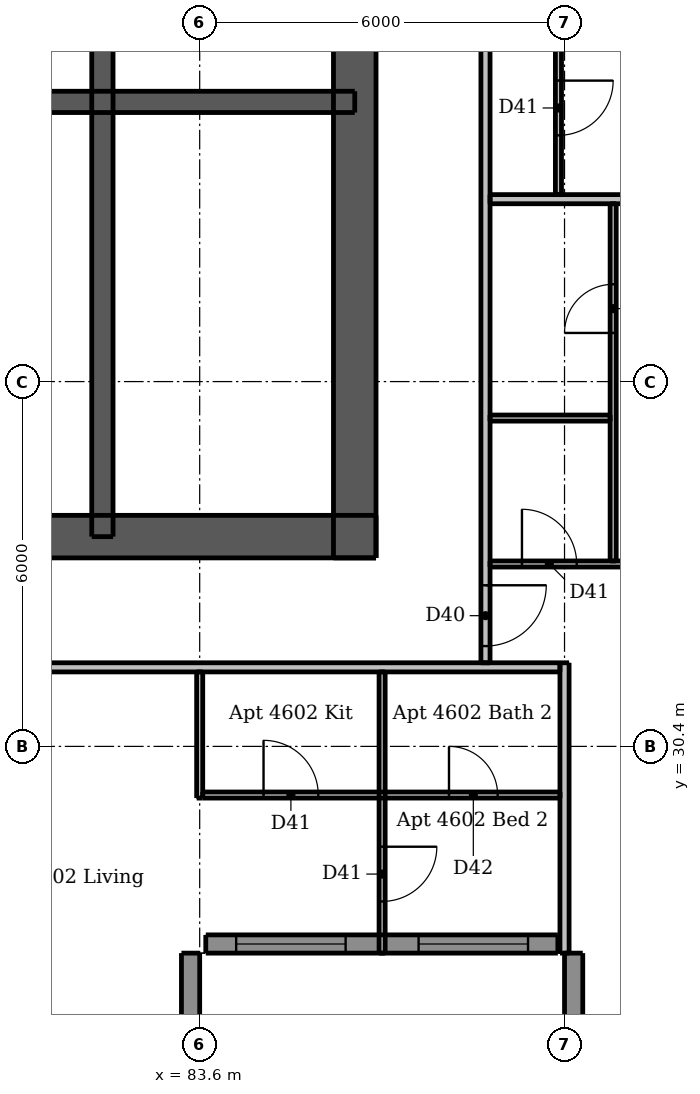
"""IFC4 building model, lengths in metres.
Left out: names, types, materials, properties, quantities, classifications, styles, units other than length and angle.
Written with IfcOpenShell. Run it as: python <this file> out.ifc"""

import sys

from ifc_helpers import new_model, si_unit, direction, frame, frame_2d, origin, place, context, subcontext, project, spatial, rectangle, extrude, element, fill, save


model = new_model("IFC4")
c1 = context("Model", 3, precision=1e-05, world=origin(), true_north=direction((0.0, 1.0)))
c2 = subcontext(c1, "Body", "Model", "MODEL_VIEW")
j1 = project(units=[si_unit("LENGTHUNIT", "METRE"), si_unit("PLANEANGLEUNIT", "RADIAN")], contexts=[c1])
p1 = place(None, origin())
s1 = spatial("IfcSite", under=j1, at=p1, CompositionType="ELEMENT")
p2 = place(p1, origin())
s2 = spatial("IfcBuilding", under=s1, at=p2, CompositionType="ELEMENT")
p3 = place(p2, frame((0.0, 0.0, 171.4)))
s3 = spatial("IfcBuildingStorey", under=s2, at=p3, CompositionType="ELEMENT", Elevation=171.4)
p4 = place(p3, frame((62.5, 33.85, 0.0), z_axis=(0.0, 0.0, 1.0), x_axis=(1.0, 0.0, 0.0)))
e1 = element("IfcWall", 1, at=p4, inside=s3, PredefinedType="SHEAR", context=c2, shape_type="SweptSolid", body=[
    extrude(rectangle(XDim=24.0, YDim=0.7, at=frame_2d((12.0, 0.0))), origin(), (0.0, 0.0, 1.0), 3.05),
])
p5 = place(p4, frame((1.962, 0.0, 0.0)))
e2 = element("IfcOpeningElement", 2, at=p5, cuts=e1, PredefinedType="OPENING", context=c2, shape_type="SweptSolid", body=[
    extrude(rectangle(XDim=1.1, YDim=2.1, at=frame_2d((0.55, 1.05))), frame((0.0, 0.36, 0.0), z_axis=(0.0, -1.0, 0.0), x_axis=(1.0, 0.0, 0.0)), (0.0, 0.0, 1.0), 0.72),
])
p6 = place(p4, frame((20.938, 0.0, 0.0)))
e3 = element("IfcOpeningElement", 3, at=p6, cuts=e1, PredefinedType="OPENING", context=c2, shape_type="SweptSolid", body=[
    extrude(rectangle(XDim=1.1, YDim=2.1, at=frame_2d((0.55, 1.05))), frame((0.0, 0.36, 0.0), z_axis=(0.0, -1.0, 0.0), x_axis=(1.0, 0.0, 0.0)), (0.0, 0.0, 1.0), 0.72),
])
p7 = place(p4, frame((8.0, 0.0, 0.0)))
e4 = element("IfcOpeningElement", 4, at=p7, cuts=e1, PredefinedType="OPENING", context=c2, shape_type="SweptSolid", body=[
    extrude(rectangle(XDim=1.1, YDim=2.1, at=frame_2d((0.55, 1.05))), frame((0.0, 0.36, 0.0), z_axis=(0.0, -1.0, 0.0), x_axis=(1.0, 0.0, 0.0)), (0.0, 0.0, 1.0), 0.72),
])
p8 = place(p4, frame((16.375, 0.0, 0.0)))
e5 = element("IfcOpeningElement", 5, at=p8, cuts=e1, PredefinedType="OPENING", context=c2, shape_type="SweptSolid", body=[
    extrude(rectangle(XDim=0.9, YDim=2.1, at=frame_2d((0.45, 1.05))), frame((0.0, 0.36, 0.0), z_axis=(0.0, -1.0, 0.0), x_axis=(1.0, 0.0, 0.0)), (0.0, 0.0, 1.0), 0.72),
])
p9 = place(p3, frame((86.15, 33.5, 0.0), z_axis=(0.0, 0.0, 1.0), x_axis=(0.0, 1.0, 0.0)))
e6 = element("IfcWall", 6, at=p9, inside=s3, PredefinedType="SHEAR", context=c2, shape_type="SweptSolid", body=[
    extrude(rectangle(XDim=24.0, YDim=0.7, at=frame_2d((12.0, 0.0))), origin(), (0.0, 0.0, 1.0), 3.05),
])
p10 = place(p9, frame((11.2, 0.0, 0.0)))
e7 = element("IfcOpeningElement", 7, at=p10, cuts=e6, PredefinedType="OPENING", context=c2, shape_type="SweptSolid", body=[
    extrude(rectangle(XDim=1.6, YDim=2.1, at=frame_2d((0.8, 1.05))), frame((0.0, 0.36, 0.0), z_axis=(0.0, -1.0, 0.0), x_axis=(1.0, 0.0, 0.0)), (0.0, 0.0, 1.0), 0.72),
])
p11 = place(p3, frame((62.85, 41.0, 0.0), z_axis=(0.0, 0.0, 1.0), x_axis=(1.0, 0.0, 0.0)))
e8 = element("IfcWall", 8, at=p11, inside=s3, PredefinedType="SHEAR", context=c2, shape_type="SweptSolid", body=[
    extrude(rectangle(XDim=23.3, YDim=0.35, at=frame_2d((11.65, 0.0))), origin(), (0.0, 0.0, 1.0), 3.05),
])
p12 = place(p3, frame((82.0, 33.85, 0.0), z_axis=(0.0, 0.0, 1.0), x_axis=(0.0, 1.0, 0.0)))
e9 = element("IfcWall", 9, at=p12, inside=s3, PredefinedType="SHEAR", context=c2, shape_type="SweptSolid", body=[
    extrude(rectangle(XDim=10.05, YDim=0.35, at=frame_2d((5.025, 0.0))), origin(), (0.0, 0.0, 1.0), 3.05),
])
for number, where, z_axis, x_axis in (
    (10, (83.45, 25.3, 0.0), (0.0, 0.0, 1.0), (0.0, 1.0, 0.0)),
    (11, (89.75, 27.0, 0.0), (0.0, 0.0, 1.0), (0.0, -1.0, 0.0)),
):
    element("IfcWall", number, at=place(p3, frame(where, z_axis=z_axis, x_axis=x_axis)), inside=s3, PredefinedType="SOLIDWALL", context=c2, shape_type="SweptSolid", body=[
        extrude(rectangle(XDim=1.7, YDim=0.3, at=frame_2d((0.85, 0.0))), origin(), (0.0, 0.0, 1.0), 3.05),
    ])
p13 = place(p3, frame((83.7, 27.15, 0.0), z_axis=(0.0, 0.0, 1.0), x_axis=(1.0, 0.0, 0.0)))
e12 = element("IfcWall", 12, at=p13, inside=s3, PredefinedType="SOLIDWALL", context=c2, shape_type="SweptSolid", body=[
    extrude(rectangle(XDim=5.79, YDim=0.3, at=frame_2d((2.895, 0.0))), origin(), (0.0, 0.0, 1.0), 3.05),
])
p14 = place(p13, frame((0.5, 0.0, 0.15)))
e13 = element("IfcOpeningElement", 13, at=p14, cuts=e12, PredefinedType="OPENING", context=c2, shape_type="SweptSolid", body=[
    extrude(rectangle(XDim=1.8, YDim=2.1, at=frame_2d((0.9, 1.05))), frame((0.0, 0.16, 0.0), z_axis=(0.0, -1.0, 0.0), x_axis=(1.0, 0.0, 0.0)), (0.0, 0.0, 1.0), 0.32),
])
p15 = place(p13, frame((3.5, 0.0, 0.15)))
e14 = element("IfcOpeningElement", 14, at=p15, cuts=e12, PredefinedType="OPENING", context=c2, shape_type="SweptSolid", body=[
    extrude(rectangle(XDim=1.8, YDim=2.1, at=frame_2d((0.9, 1.05))), frame((0.0, 0.16, 0.0), z_axis=(0.0, -1.0, 0.0), x_axis=(1.0, 0.0, 0.0)), (0.0, 0.0, 1.0), 0.32),
])
p16 = place(p3, frame((83.6, 29.55, 0.0), z_axis=(0.0, 0.0, 1.0), x_axis=(0.0, 1.0, 0.0)))
e15 = element("IfcWall", 15, at=p16, inside=s3, PredefinedType="PARTITIONING", context=c2, shape_type="SweptSolid", body=[
    extrude(rectangle(XDim=2.075, YDim=0.1, at=frame_2d((1.038, 0.0))), origin(), (0.0, 0.0, 1.0), 2.59),
])
p17 = place(p3, frame((86.6, 31.625, 0.0), z_axis=(0.0, 0.0, 1.0), x_axis=(0.0, -1.0, 0.0)))
e16 = element("IfcWall", 16, at=p17, inside=s3, PredefinedType="PARTITIONING", context=c2, shape_type="SweptSolid", body=[
    extrude(rectangle(XDim=4.625, YDim=0.1, at=frame_2d((2.312, 0.0))), origin(), (0.0, 0.0, 1.0), 3.05),
])
p18 = place(p17, frame((2.875, 0.0, 0.0)))
e17 = element("IfcOpeningElement", 17, at=p18, cuts=e16, PredefinedType="OPENING", context=c2, shape_type="SweptSolid", body=[
    extrude(rectangle(XDim=0.9, YDim=2.1, at=frame_2d((0.45, 1.05))), frame((0.0, 0.06, 0.0), z_axis=(0.0, -1.0, 0.0), x_axis=(1.0, 0.0, 0.0)), (0.0, 0.0, 1.0), 0.12),
])
p19 = place(p3, frame((89.5, 60.325, 0.0), z_axis=(0.0, 0.0, 1.0), x_axis=(0.0, -1.0, 0.0)))
e18 = element("IfcWall", 18, at=p19, inside=s3, PredefinedType="PARTITIONING", context=c2, shape_type="SweptSolid", body=[
    extrude(rectangle(XDim=20.85, YDim=0.1, at=frame_2d((10.425, 0.0))), origin(), (0.0, 0.0, 1.0), 2.51),
])
p20 = place(p19, frame((9.675, 0.0, 0.0)))
e19 = element("IfcOpeningElement", 19, at=p20, cuts=e18, PredefinedType="OPENING", context=c2, shape_type="SweptSolid", body=[
    extrude(rectangle(XDim=0.9, YDim=2.1, at=frame_2d((0.45, 1.05))), frame((0.0, 0.06, 0.0), z_axis=(0.0, -1.0, 0.0), x_axis=(1.0, 0.0, 0.0)), (0.0, 0.0, 1.0), 0.12),
])
p21 = place(p19, frame((6.675, 0.0, 0.0)))
e20 = element("IfcOpeningElement", 20, at=p21, cuts=e18, PredefinedType="OPENING", context=c2, shape_type="SweptSolid", body=[
    extrude(rectangle(XDim=0.9, YDim=2.1, at=frame_2d((0.45, 1.05))), frame((0.0, 0.06, 0.0), z_axis=(0.0, -1.0, 0.0), x_axis=(1.0, 0.0, 0.0)), (0.0, 0.0, 1.0), 0.12),
])
p22 = place(p19, frame((18.975, 0.0, 0.0)))
e21 = element("IfcOpeningElement", 21, at=p22, cuts=e18, PredefinedType="OPENING", context=c2, shape_type="SweptSolid", body=[
    extrude(rectangle(XDim=0.9, YDim=2.1, at=frame_2d((0.45, 1.05))), frame((0.0, 0.06, 0.0), z_axis=(0.0, -1.0, 0.0), x_axis=(1.0, 0.0, 0.0)), (0.0, 0.0, 1.0), 0.12),
])
p23 = place(p19, frame((15.975, 0.0, 0.0)))
e22 = element("IfcOpeningElement", 22, at=p23, cuts=e18, PredefinedType="OPENING", context=c2, shape_type="SweptSolid", body=[
    extrude(rectangle(XDim=0.9, YDim=2.1, at=frame_2d((0.45, 1.05))), frame((0.0, 0.06, 0.0), z_axis=(0.0, -1.0, 0.0), x_axis=(1.0, 0.0, 0.0)), (0.0, 0.0, 1.0), 0.12),
])
p24 = place(p19, frame((12.975, 0.0, 0.0)))
e23 = element("IfcOpeningElement", 23, at=p24, cuts=e18, PredefinedType="OPENING", context=c2, shape_type="SweptSolid", body=[
    extrude(rectangle(XDim=0.9, YDim=2.1, at=frame_2d((0.45, 1.05))), frame((0.0, 0.06, 0.0), z_axis=(0.0, -1.0, 0.0), x_axis=(1.0, 0.0, 0.0)), (0.0, 0.0, 1.0), 0.12),
])
p25 = place(p19, frame((1.275, 0.0, 0.0)))
e24 = element("IfcOpeningElement", 24, at=p25, cuts=e18, PredefinedType="OPENING", context=c2, shape_type="SweptSolid", body=[
    extrude(rectangle(XDim=0.9, YDim=2.1, at=frame_2d((0.45, 1.05))), frame((0.0, 0.06, 0.0), z_axis=(0.0, -1.0, 0.0), x_axis=(1.0, 0.0, 0.0)), (0.0, 0.0, 1.0), 0.12),
])
p26 = place(p19, frame((4.325, 0.0, 0.0)))
e25 = element("IfcOpeningElement", 25, at=p26, cuts=e18, PredefinedType="OPENING", context=c2, shape_type="SweptSolid", body=[
    extrude(rectangle(XDim=0.8, YDim=2.1, at=frame_2d((0.4, 1.05))), frame((0.0, 0.06, 0.0), z_axis=(0.0, -1.0, 0.0), x_axis=(1.0, 0.0, 0.0)), (0.0, 0.0, 1.0), 0.12),
])
p27 = place(p3, frame((90.4, 33.45, 0.0), z_axis=(0.0, 0.0, 1.0), x_axis=(0.0, 1.0, 0.0)))
e26 = element("IfcWall", 26, at=p27, inside=s3, PredefinedType="PARTITIONING", context=c2, shape_type="SweptSolid", body=[
    extrude(rectangle(XDim=5.875, YDim=0.1, at=frame_2d((2.938, 0.0))), origin(), (0.0, 0.0, 1.0), 3.05),
])
p28 = place(p27, frame((3.75, 0.0, 0.0)))
e27 = element("IfcOpeningElement", 27, at=p28, cuts=e26, PredefinedType="OPENING", context=c2, shape_type="SweptSolid", body=[
    extrude(rectangle(XDim=0.8, YDim=2.1, at=frame_2d((0.4, 1.05))), frame((0.0, 0.06, 0.0), z_axis=(0.0, -1.0, 0.0), x_axis=(1.0, 0.0, 0.0)), (0.0, 0.0, 1.0), 0.12),
])
p29 = place(p3, frame((88.375, 35.8, 0.0), z_axis=(0.0, 0.0, 1.0), x_axis=(1.0, 0.0, 0.0)))
e28 = element("IfcWall", 28, at=p29, inside=s3, PredefinedType="PARTITIONING", context=c2, shape_type="SweptSolid", body=[
    extrude(rectangle(XDim=1.975, YDim=0.1, at=frame_2d((0.988, 0.0))), origin(), (0.0, 0.0, 1.0), 3.05),
])
p30 = place(p3, frame((88.375, 33.4, 0.0), z_axis=(0.0, 0.0, 1.0), x_axis=(1.0, 0.0, 0.0)))
e29 = element("IfcWall", 29, at=p30, inside=s3, PredefinedType="PARTITIONING", context=c2, shape_type="SweptSolid", body=[
    extrude(rectangle(XDim=7.625, YDim=0.1, at=frame_2d((3.812, 0.0))), origin(), (0.0, 0.0, 1.0), 3.05),
])
p31 = place(p30, frame((0.525, 0.0, 0.0)))
e30 = element("IfcOpeningElement", 30, at=p31, cuts=e29, PredefinedType="OPENING", context=c2, shape_type="SweptSolid", body=[
    extrude(rectangle(XDim=0.9, YDim=2.1, at=frame_2d((0.45, 1.05))), frame((0.0, 0.06, 0.0), z_axis=(0.0, -1.0, 0.0), x_axis=(1.0, 0.0, 0.0)), (0.0, 0.0, 1.0), 0.12),
])
p32 = place(p30, frame((4.375, 0.0, 0.0)))
e31 = element("IfcOpeningElement", 31, at=p32, cuts=e29, PredefinedType="OPENING", context=c2, shape_type="SweptSolid", body=[
    extrude(rectangle(XDim=0.9, YDim=2.1, at=frame_2d((0.45, 1.05))), frame((0.0, 0.06, 0.0), z_axis=(0.0, -1.0, 0.0), x_axis=(1.0, 0.0, 0.0)), (0.0, 0.0, 1.0), 0.12),
])
p33 = place(p3, frame((83.65, 29.6, 0.0), z_axis=(0.0, 0.0, 1.0), x_axis=(1.0, 0.0, 0.0)))
e32 = element("IfcWall", 32, at=p33, inside=s3, PredefinedType="PARTITIONING", context=c2, shape_type="SweptSolid", body=[
    extrude(rectangle(XDim=5.875, YDim=0.1, at=frame_2d((2.938, 0.0))), origin(), (0.0, 0.0, 1.0), 3.05),
])
p34 = place(p33, frame((1.0, 0.0, 0.0)))
e33 = element("IfcOpeningElement", 33, at=p34, cuts=e32, PredefinedType="OPENING", context=c2, shape_type="SweptSolid", body=[
    extrude(rectangle(XDim=0.9, YDim=2.1, at=frame_2d((0.45, 1.05))), frame((0.0, 0.06, 0.0), z_axis=(0.0, -1.0, 0.0), x_axis=(1.0, 0.0, 0.0)), (0.0, 0.0, 1.0), 0.12),
])
p35 = place(p33, frame((4.05, 0.0, 0.0)))
e34 = element("IfcOpeningElement", 34, at=p35, cuts=e32, PredefinedType="OPENING", context=c2, shape_type="SweptSolid", body=[
    extrude(rectangle(XDim=0.8, YDim=2.1, at=frame_2d((0.4, 1.05))), frame((0.0, 0.06, 0.0), z_axis=(0.0, -1.0, 0.0), x_axis=(1.0, 0.0, 0.0)), (0.0, 0.0, 1.0), 0.12),
])
p36 = place(p3, frame((88.3, 61.175, 0.0), z_axis=(0.0, 0.0, 1.0), x_axis=(0.0, -1.0, 0.0)))
e35 = element("IfcWall", 35, at=p36, inside=s3, PredefinedType="PARTITIONING", context=c2, shape_type="SweptSolid", body=[
    extrude(rectangle(XDim=29.4, YDim=0.15, at=frame_2d((14.7, 0.0))), origin(), (0.0, 0.0, 1.0), 3.05),
])
p37 = place(p36, frame((28.125, 0.0, 0.0)))
e36 = element("IfcOpeningElement", 36, at=p37, cuts=e35, PredefinedType="OPENING", context=c2, shape_type="SweptSolid", body=[
    extrude(rectangle(XDim=1.0, YDim=2.1, at=frame_2d((0.5, 1.05))), frame((0.0, 0.085, 0.0), z_axis=(0.0, -1.0, 0.0), x_axis=(1.0, 0.0, 0.0)), (0.0, 0.0, 1.0), 0.17),
])
p38 = place(p36, frame((10.775, 0.0, 0.0)))
e37 = element("IfcOpeningElement", 37, at=p38, cuts=e35, PredefinedType="OPENING", context=c2, shape_type="SweptSolid", body=[
    extrude(rectangle(XDim=1.0, YDim=2.1, at=frame_2d((0.5, 1.05))), frame((0.0, 0.085, 0.0), z_axis=(0.0, -1.0, 0.0), x_axis=(1.0, 0.0, 0.0)), (0.0, 0.0, 1.0), 0.17),
])
p39 = place(p3, frame((89.6, 27.0, 0.0), z_axis=(0.0, 0.0, 1.0), x_axis=(0.0, 1.0, 0.0)))
e38 = element("IfcWall", 38, at=p39, inside=s3, PredefinedType="PARTITIONING", context=c2, shape_type="SweptSolid", body=[
    extrude(rectangle(XDim=4.775, YDim=0.15, at=frame_2d((2.387, 0.0))), origin(), (0.0, 0.0, 1.0), 2.51),
])
p40 = place(p3, frame((88.375, 39.4, 0.0), z_axis=(0.0, 0.0, 1.0), x_axis=(1.0, 0.0, 0.0)))
e39 = element("IfcWall", 39, at=p40, inside=s3, PredefinedType="PARTITIONING", context=c2, shape_type="SweptSolid", body=[
    extrude(rectangle(XDim=7.625, YDim=0.15, at=frame_2d((3.812, 0.0))), origin(), (0.0, 0.0, 1.0), 3.05),
])
p41 = place(p3, frame((89.525, 31.7, 0.0), z_axis=(0.0, 0.0, 1.0), x_axis=(-1.0, 0.0, 0.0)))
e40 = element("IfcWall", 40, at=p41, inside=s3, PredefinedType="PARTITIONING", context=c2, shape_type="SweptSolid", body=[
    extrude(rectangle(XDim=30.55, YDim=0.15, at=frame_2d((15.275, 0.0))), origin(), (0.0, 0.0, 1.0), 3.05),
])
p42 = place(p41, frame((26.775, 0.0, 0.0)))
e41 = element("IfcOpeningElement", 41, at=p42, cuts=e40, PredefinedType="OPENING", context=c2, shape_type="SweptSolid", body=[
    extrude(rectangle(XDim=1.0, YDim=2.1, at=frame_2d((0.5, 1.05))), frame((0.0, 0.085, 0.0), z_axis=(0.0, -1.0, 0.0), x_axis=(1.0, 0.0, 0.0)), (0.0, 0.0, 1.0), 0.17),
])
p43 = place(p41, frame((8.425, 0.0, 0.0)))
e42 = element("IfcOpeningElement", 42, at=p43, cuts=e40, PredefinedType="OPENING", context=c2, shape_type="SweptSolid", body=[
    extrude(rectangle(XDim=1.0, YDim=2.1, at=frame_2d((0.5, 1.05))), frame((0.0, 0.085, 0.0), z_axis=(0.0, -1.0, 0.0), x_axis=(1.0, 0.0, 0.0)), (0.0, 0.0, 1.0), 0.17),
])
p44 = place(p14, origin())
e43 = element("IfcWindow", 43, at=p44, inside=s3, PartitioningType="DOUBLE_PANEL_VERTICAL", PredefinedType="WINDOW", context=c2, shape_type="SweptSolid", body=[
    extrude(rectangle(XDim=1.8, YDim=2.1, at=frame_2d((0.9, 1.05))), frame((0.0, 0.03, 0.0), z_axis=(0.0, -1.0, 0.0), x_axis=(1.0, 0.0, 0.0)), (0.0, 0.0, 1.0), 0.06),
])
fill(e13, e43)
p45 = place(p15, origin())
e44 = element("IfcWindow", 44, at=p45, inside=s3, PartitioningType="DOUBLE_PANEL_VERTICAL", PredefinedType="WINDOW", context=c2, shape_type="SweptSolid", body=[
    extrude(rectangle(XDim=1.8, YDim=2.1, at=frame_2d((0.9, 1.05))), frame((0.0, 0.03, 0.0), z_axis=(0.0, -1.0, 0.0), x_axis=(1.0, 0.0, 0.0)), (0.0, 0.0, 1.0), 0.06),
])
fill(e14, e44)
p46 = place(p6, origin())
e45 = element("IfcDoor", 45, at=p46, inside=s3, OperationType="SINGLE_SWING_RIGHT", PredefinedType="DOOR", context=c2, shape_type="SweptSolid", body=[
    extrude(rectangle(XDim=1.1, YDim=2.1, at=frame_2d((0.55, 1.05))), frame((0.0, 0.337, 0.0), z_axis=(0.0, -1.0, 0.0), x_axis=(1.0, 0.0, 0.0)), (0.0, 0.0, 1.0), 0.05),
])
fill(e3, e45)
p47 = place(p34, origin())
e46 = element("IfcDoor", 46, at=p47, inside=s3, OperationType="SINGLE_SWING_LEFT", PredefinedType="DOOR", context=c2, shape_type="SweptSolid", body=[
    extrude(rectangle(XDim=0.9, YDim=2.1, at=frame_2d((0.45, 1.05))), frame((0.0, 0.025, 0.0), z_axis=(0.0, -1.0, 0.0), x_axis=(1.0, 0.0, 0.0)), (0.0, 0.0, 1.0), 0.05),
])
fill(e33, e46)
p48 = place(p18, origin())
e47 = element("IfcDoor", 47, at=p48, inside=s3, OperationType="SINGLE_SWING_LEFT", PredefinedType="DOOR", context=c2, shape_type="SweptSolid", body=[
    extrude(rectangle(XDim=0.9, YDim=2.1, at=frame_2d((0.45, 1.05))), frame((0.0, 0.025, 0.0), z_axis=(0.0, -1.0, 0.0), x_axis=(1.0, 0.0, 0.0)), (0.0, 0.0, 1.0), 0.05),
])
fill(e17, e47)
p49 = place(p35, origin())
e48 = element("IfcDoor", 48, at=p49, inside=s3, OperationType="SINGLE_SWING_LEFT", PredefinedType="DOOR", context=c2, shape_type="SweptSolid", body=[
    extrude(rectangle(XDim=0.8, YDim=2.1, at=frame_2d((0.4, 1.05))), frame((0.0, 0.025, 0.0), z_axis=(0.0, -1.0, 0.0), x_axis=(1.0, 0.0, 0.0)), (0.0, 0.0, 1.0), 0.05),
])
fill(e34, e48)
p50 = place(p37, origin())
e49 = element("IfcDoor", 49, at=p50, inside=s3, OperationType="SINGLE_SWING_LEFT", PredefinedType="DOOR", context=c2, shape_type="SweptSolid", body=[
    extrude(rectangle(XDim=1.0, YDim=2.1, at=frame_2d((0.5, 1.05))), frame((0.0, 0.025, 0.0), z_axis=(0.0, -1.0, 0.0), x_axis=(1.0, 0.0, 0.0)), (0.0, 0.0, 1.0), 0.05),
])
fill(e36, e49)
p51 = place(p31, origin())
e50 = element("IfcDoor", 50, at=p51, inside=s3, OperationType="SINGLE_SWING_LEFT", PredefinedType="DOOR", context=c2, shape_type="SweptSolid", body=[
    extrude(rectangle(XDim=0.9, YDim=2.1, at=frame_2d((0.45, 1.05))), frame((0.0, 0.025, 0.0), z_axis=(0.0, -1.0, 0.0), x_axis=(1.0, 0.0, 0.0)), (0.0, 0.0, 1.0), 0.05),
])
fill(e30, e50)
p52 = place(p28, origin())
e51 = element("IfcDoor", 51, at=p52, inside=s3, OperationType="SINGLE_SWING_LEFT", PredefinedType="DOOR", context=c2, shape_type="SweptSolid", body=[
    extrude(rectangle(XDim=0.8, YDim=2.1, at=frame_2d((0.4, 1.05))), frame((0.0, 0.025, 0.0), z_axis=(0.0, -1.0, 0.0), x_axis=(1.0, 0.0, 0.0)), (0.0, 0.0, 1.0), 0.05),
])
fill(e27, e51)
p53 = place(p22, origin())
e52 = element("IfcDoor", 52, at=p53, inside=s3, OperationType="SINGLE_SWING_LEFT", PredefinedType="DOOR", context=c2, shape_type="SweptSolid", body=[
    extrude(rectangle(XDim=0.9, YDim=2.1, at=frame_2d((0.45, 1.05))), frame((0.0, 0.025, 0.0), z_axis=(0.0, -1.0, 0.0), x_axis=(1.0, 0.0, 0.0)), (0.0, 0.0, 1.0), 0.05),
])
fill(e21, e52)
save(model, sys.argv[1])
